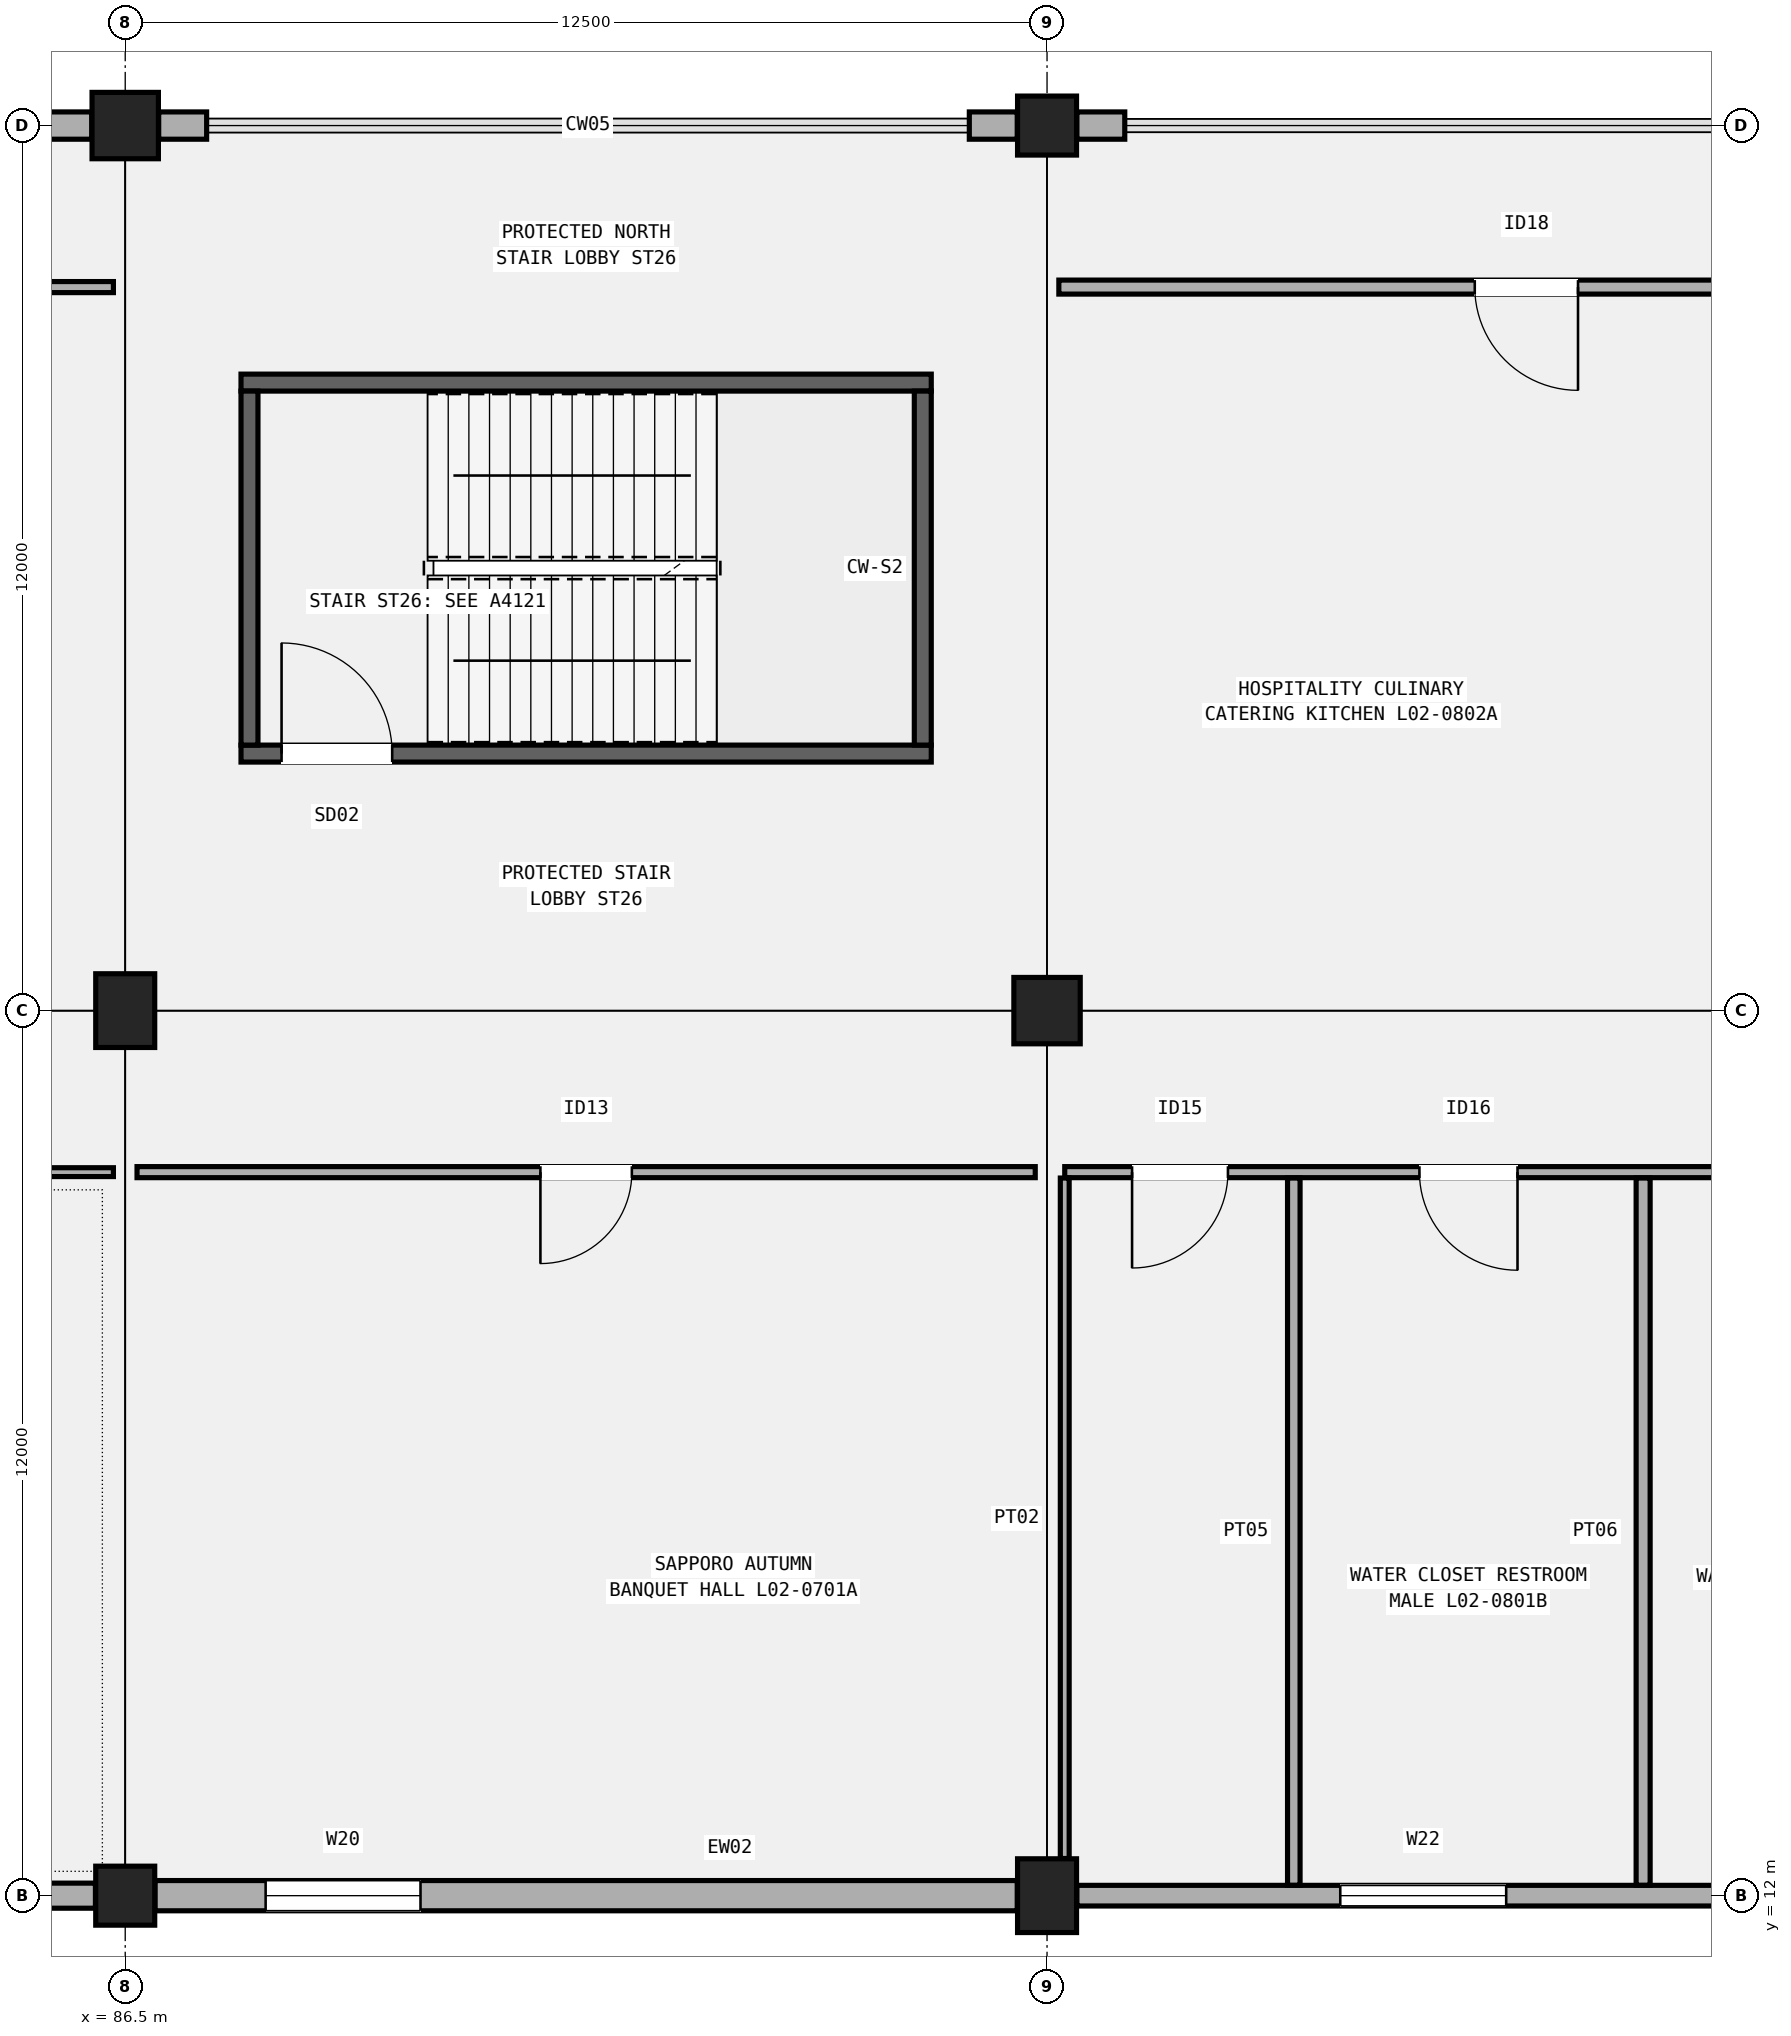
"""IFC4 building model, lengths in metres.
Left out: names, types, materials, properties, quantities, classifications, styles, units other than length and angle.
Written with IfcOpenShell. Run it as: python <this file> out.ifc"""

import sys

from ifc_helpers import new_model, si_unit, direction, frame, frame_2d, origin, origin_2d, place, context, subcontext, project, spatial, rectangle, extrude, element, fill, save


model = new_model("IFC4")
c1 = context("Model", 3, precision=1e-05, world=origin(), true_north=direction((0.0, 1.0)))
c2 = subcontext(c1, "Body", "Model", "MODEL_VIEW")
j1 = project(units=[si_unit("LENGTHUNIT", "METRE"), si_unit("PLANEANGLEUNIT", "RADIAN")], contexts=[c1])
p1 = place(None, origin())
s1 = spatial("IfcSite", under=j1, at=p1, CompositionType="ELEMENT")
p2 = place(p1, origin())
s2 = spatial("IfcBuilding", under=s1, at=p2, CompositionType="ELEMENT")
p3 = place(p2, frame((0.0, 0.0, 10.2)))
s3 = spatial("IfcBuildingStorey", under=s2, at=p3, CompositionType="ELEMENT", Elevation=10.2)
p4 = place(p3, frame((86.5, 12.0, 0.0), z_axis=(0.0, 0.0, 1.0), x_axis=(1.0, 0.0, 0.0)))
e1 = element("IfcColumn", 1, at=p4, inside=s3, PredefinedType="COLUMN", context=c2, shape_type="SweptSolid", body=[
    extrude(rectangle(XDim=0.8, YDim=0.8, at=origin_2d()), origin(), (0.0, 0.0, 1.0), 5.1),
])
p5 = place(p3, frame((86.5, 24.0, 0.0), z_axis=(0.0, 0.0, 1.0), x_axis=(1.0, 0.0, 0.0)))
e2 = element("IfcColumn", 2, at=p5, inside=s3, PredefinedType="COLUMN", context=c2, shape_type="SweptSolid", body=[
    extrude(rectangle(XDim=0.8, YDim=1.0, at=origin_2d()), origin(), (0.0, 0.0, 1.0), 5.1),
])
p6 = place(p3, frame((86.5, 36.0, 0.0), z_axis=(0.0, 0.0, 1.0), x_axis=(1.0, 0.0, 0.0)))
e3 = element("IfcColumn", 3, at=p6, inside=s3, PredefinedType="COLUMN", context=c2, shape_type="SweptSolid", body=[
    extrude(rectangle(XDim=0.9, YDim=0.9, at=origin_2d()), origin(), (0.0, 0.0, 1.0), 5.1),
])
p7 = place(p3, frame((99.0, 12.0, 0.0), z_axis=(0.0, 0.0, 1.0), x_axis=(1.0, 0.0, 0.0)))
e4 = element("IfcColumn", 4, at=p7, inside=s3, PredefinedType="COLUMN", context=c2, shape_type="SweptSolid", body=[
    extrude(rectangle(XDim=0.8, YDim=1.0, at=origin_2d()), origin(), (0.0, 0.0, 1.0), 5.1),
])
p8 = place(p3, frame((99.0, 24.0, 0.0), z_axis=(0.0, 0.0, 1.0), x_axis=(1.0, 0.0, 0.0)))
e5 = element("IfcColumn", 5, at=p8, inside=s3, PredefinedType="COLUMN", context=c2, shape_type="SweptSolid", body=[
    extrude(rectangle(XDim=0.9, YDim=0.9, at=origin_2d()), origin(), (0.0, 0.0, 1.0), 5.1),
])
p9 = place(p3, frame((99.0, 36.0, 0.0), z_axis=(0.0, 0.0, 1.0), x_axis=(1.0, 0.0, 0.0)))
e6 = element("IfcColumn", 6, at=p9, inside=s3, PredefinedType="COLUMN", context=c2, shape_type="SweptSolid", body=[
    extrude(rectangle(XDim=0.8, YDim=0.8, at=origin_2d()), origin(), (0.0, 0.0, 1.0), 5.1),
])
p10 = place(p3, frame((74.454, 12.0, 0.0), z_axis=(0.0, 0.0, 1.0), x_axis=(1.0, 0.0, 0.0)))
e7 = element("IfcWall", 7, at=p10, inside=s3, PredefinedType="SOLIDWALL", context=c2, shape_type="SweptSolid", body=[
    extrude(rectangle(XDim=11.642, YDim=0.34, at=frame_2d((5.821, 0.0))), origin(), (0.0, 0.0, 1.0), 4.12),
])
p11 = place(p10, frame((1.5, 0.0, 0.95)))
e8 = element("IfcOpeningElement", 8, at=p11, cuts=e7, PredefinedType="OPENING", context=c2, shape_type="SweptSolid", body=[
    extrude(rectangle(XDim=2.1, YDim=1.85, at=frame_2d((1.05, 0.925))), frame((0.0, 0.18, 0.0), z_axis=(0.0, -1.0, 0.0), x_axis=(1.0, 0.0, 0.0)), (0.0, 0.0, 1.0), 0.36),
])
p12 = place(p3, frame((85.396, 36.0, 0.0), z_axis=(0.0, 0.0, 1.0), x_axis=(1.0, 0.0, 0.0)))
e9 = element("IfcWall", 9, at=p12, inside=s3, PredefinedType="SOLIDWALL", context=c2, shape_type="SweptSolid", body=[
    extrude(rectangle(XDim=0.65, YDim=0.37, at=frame_2d((0.325, 0.0))), origin(), (0.0, 0.0, 1.0), 4.02),
])
p13 = place(p3, frame((86.904, 12.0, 0.0), z_axis=(0.0, 0.0, 1.0), x_axis=(1.0, 0.0, 0.0)))
e10 = element("IfcWall", 10, at=p13, inside=s3, PredefinedType="SOLIDWALL", context=c2, shape_type="SweptSolid", body=[
    extrude(rectangle(XDim=11.692, YDim=0.41, at=frame_2d((5.846, 0.0))), origin(), (0.0, 0.0, 1.0), 4.22),
])
p14 = place(p13, frame((1.5, 0.0, 0.95)))
e11 = element("IfcOpeningElement", 11, at=p14, cuts=e10, PredefinedType="OPENING", context=c2, shape_type="SweptSolid", body=[
    extrude(rectangle(XDim=2.1, YDim=2.6, at=frame_2d((1.05, 1.3))), frame((0.0, 0.215, 0.0), z_axis=(0.0, -1.0, 0.0), x_axis=(1.0, 0.0, 0.0)), (0.0, 0.0, 1.0), 0.43),
])
for number, where, z_axis, x_axis in (
    (12, (86.954, 36.0, 0.0), (0.0, 0.0, 1.0), (1.0, 0.0, 0.0)),
    (13, (97.946, 36.0, 0.0), (0.0, 0.0, 1.0), (1.0, 0.0, 0.0)),
):
    element("IfcWall", number, at=place(p3, frame(where, z_axis=z_axis, x_axis=x_axis)), inside=s3, PredefinedType="SOLIDWALL", context=c2, shape_type="SweptSolid", body=[
        extrude(rectangle(XDim=0.65, YDim=0.37, at=frame_2d((0.325, 0.0))), origin(), (0.0, 0.0, 1.0), 4.12),
    ])
p15 = place(p3, frame((99.404, 12.0, 0.0), z_axis=(0.0, 0.0, 1.0), x_axis=(1.0, 0.0, 0.0)))
e14 = element("IfcWall", 14, at=p15, inside=s3, PredefinedType="SOLIDWALL", context=c2, shape_type="SweptSolid", body=[
    extrude(rectangle(XDim=12.142, YDim=0.28, at=frame_2d((6.071, 0.0))), origin(), (0.0, 0.0, 1.0), 4.02),
])
p16 = place(p15, frame((3.572, 0.0, 0.95)))
e15 = element("IfcOpeningElement", 15, at=p16, cuts=e14, PredefinedType="OPENING", context=c2, shape_type="SweptSolid", body=[
    extrude(rectangle(XDim=2.25, YDim=2.2, at=frame_2d((1.125, 1.1))), frame((0.0, 0.15, 0.0), z_axis=(0.0, -1.0, 0.0), x_axis=(1.0, 0.0, 0.0)), (0.0, 0.0, 1.0), 0.3),
])
p17 = place(p3, frame((99.404, 36.0, 0.0), z_axis=(0.0, 0.0, 1.0), x_axis=(1.0, 0.0, 0.0)))
e16 = element("IfcWall", 16, at=p17, inside=s3, PredefinedType="SOLIDWALL", context=c2, shape_type="SweptSolid", body=[
    extrude(rectangle(XDim=0.65, YDim=0.37, at=frame_2d((0.325, 0.0))), origin(), (0.0, 0.0, 1.0), 4.22),
])
p18 = place(p3, frame((88.07, 27.485, 0.0), z_axis=(0.0, 0.0, 1.0), x_axis=(1.0, 0.0, 0.0)))
e17 = element("IfcWall", 17, at=p18, inside=s3, PredefinedType="SHEAR", context=c2, shape_type="SweptSolid", body=[
    extrude(rectangle(XDim=9.36, YDim=0.23, at=frame_2d((4.68, 0.0))), origin(), (0.0, 0.0, 1.0), 4.82),
])
p19 = place(p18, frame((0.55, 0.0, 0.0)))
e18 = element("IfcOpeningElement", 18, at=p19, cuts=e17, PredefinedType="OPENING", context=c2, shape_type="SweptSolid", body=[
    extrude(rectangle(XDim=1.5, YDim=2.2, at=frame_2d((0.75, 1.1))), frame((0.0, 0.125, 0.0), z_axis=(0.0, -1.0, 0.0), x_axis=(1.0, 0.0, 0.0)), (0.0, 0.0, 1.0), 0.25),
])
p20 = place(p3, frame((88.07, 32.515, 0.0), z_axis=(0.0, 0.0, 1.0), x_axis=(1.0, 0.0, 0.0)))
e19 = element("IfcWall", 19, at=p20, inside=s3, PredefinedType="SHEAR", context=c2, shape_type="SweptSolid", body=[
    extrude(rectangle(XDim=9.36, YDim=0.23, at=frame_2d((4.68, 0.0))), origin(), (0.0, 0.0, 1.0), 4.82),
])
for number, where, z_axis, x_axis in (
    (20, (88.185, 27.6, 0.0), (0.0, 0.0, 1.0), (0.0, 1.0, 0.0)),
    (21, (97.315, 27.6, 0.0), (0.0, 0.0, 1.0), (0.0, 1.0, 0.0)),
):
    element("IfcWall", number, at=place(p3, frame(where, z_axis=z_axis, x_axis=x_axis)), inside=s3, PredefinedType="SHEAR", context=c2, shape_type="SweptSolid", body=[
        extrude(rectangle(XDim=4.8, YDim=0.23, at=frame_2d((2.4, 0.0))), origin(), (0.0, 0.0, 1.0), 4.82),
    ])
p21 = place(p3, frame((74.16, 21.81, 0.0), z_axis=(0.0, 0.0, 1.0), x_axis=(1.0, 0.0, 0.0)))
e22 = element("IfcWall", 22, at=p21, inside=s3, PredefinedType="PARTITIONING", context=c2, shape_type="SweptSolid", body=[
    extrude(rectangle(XDim=12.18, YDim=0.12, at=frame_2d((6.09, 0.0))), origin(), (0.0, 0.0, 1.0), 4.22),
])
p22 = place(p21, frame((6.65, 0.0, 0.0), z_axis=(0.0, 0.0, 1.0), x_axis=(-1.0, 0.0, 0.0)))
e23 = element("IfcOpeningElement", 23, at=p22, cuts=e22, PredefinedType="OPENING", context=c2, shape_type="SweptSolid", body=[
    extrude(rectangle(XDim=1.12, YDim=2.18, at=frame_2d((0.56, 1.09))), frame((0.0, 0.07, 0.0), z_axis=(0.0, -1.0, 0.0), x_axis=(1.0, 0.0, 0.0)), (0.0, 0.0, 1.0), 0.14),
])
p23 = place(p3, frame((74.16, 33.81, 0.0), z_axis=(0.0, 0.0, 1.0), x_axis=(1.0, 0.0, 0.0)))
e24 = element("IfcWall", 24, at=p23, inside=s3, PredefinedType="PARTITIONING", context=c2, shape_type="SweptSolid", body=[
    extrude(rectangle(XDim=12.18, YDim=0.15, at=frame_2d((6.09, 0.0))), origin(), (0.0, 0.0, 1.0), 4.22),
])
p24 = place(p23, frame((6.665, 0.0, 0.0), z_axis=(0.0, 0.0, 1.0), x_axis=(-1.0, 0.0, 0.0)))
e25 = element("IfcOpeningElement", 25, at=p24, cuts=e24, PredefinedType="OPENING", context=c2, shape_type="SweptSolid", body=[
    extrude(rectangle(XDim=1.15, YDim=2.15, at=frame_2d((0.575, 1.075))), frame((0.0, 0.085, 0.0), z_axis=(0.0, -1.0, 0.0), x_axis=(1.0, 0.0, 0.0)), (0.0, 0.0, 1.0), 0.17),
])
p25 = place(p3, frame((86.66, 21.81, 0.0), z_axis=(0.0, 0.0, 1.0), x_axis=(1.0, 0.0, 0.0)))
e26 = element("IfcWall", 26, at=p25, inside=s3, PredefinedType="PARTITIONING", context=c2, shape_type="SweptSolid", body=[
    extrude(rectangle(XDim=12.18, YDim=0.15, at=frame_2d((6.09, 0.0))), origin(), (0.0, 0.0, 1.0), 4.22),
])
p26 = place(p25, frame((6.71, 0.0, 0.0), z_axis=(0.0, 0.0, 1.0), x_axis=(-1.0, 0.0, 0.0)))
e27 = element("IfcOpeningElement", 27, at=p26, cuts=e26, PredefinedType="OPENING", context=c2, shape_type="SweptSolid", body=[
    extrude(rectangle(XDim=1.24, YDim=2.22, at=frame_2d((0.62, 1.11))), frame((0.0, 0.085, 0.0), z_axis=(0.0, -1.0, 0.0), x_axis=(1.0, 0.0, 0.0)), (0.0, 0.0, 1.0), 0.17),
])
p27 = place(p3, frame((99.24, 21.81, 0.0), z_axis=(0.0, 0.0, 1.0), x_axis=(1.0, 0.0, 0.0)))
e28 = element("IfcWall", 28, at=p27, inside=s3, PredefinedType="PARTITIONING", context=c2, shape_type="SweptSolid", body=[
    extrude(rectangle(XDim=12.52, YDim=0.15, at=frame_2d((6.26, 0.0))), origin(), (0.0, 0.0, 1.0), 4.22),
])
p28 = place(p27, frame((2.213, 0.0, 0.0), z_axis=(0.0, 0.0, 1.0), x_axis=(-1.0, 0.0, 0.0)))
e29 = element("IfcOpeningElement", 29, at=p28, cuts=e28, PredefinedType="OPENING", context=c2, shape_type="SweptSolid", body=[
    extrude(rectangle(XDim=1.3, YDim=2.24, at=frame_2d((0.65, 1.12))), frame((0.0, 0.085, 0.0), z_axis=(0.0, -1.0, 0.0), x_axis=(1.0, 0.0, 0.0)), (0.0, 0.0, 1.0), 0.17),
])
p29 = place(p27, frame((6.14, 0.0, 0.0), z_axis=(0.0, 0.0, 1.0), x_axis=(-1.0, 0.0, 0.0)))
e30 = element("IfcOpeningElement", 30, at=p29, cuts=e28, PredefinedType="OPENING", context=c2, shape_type="SweptSolid", body=[
    extrude(rectangle(XDim=1.33, YDim=2.22, at=frame_2d((0.665, 1.11))), frame((0.0, 0.085, 0.0), z_axis=(0.0, -1.0, 0.0), x_axis=(1.0, 0.0, 0.0)), (0.0, 0.0, 1.0), 0.17),
])
p30 = place(p27, frame((10.852, 0.0, 0.0), z_axis=(0.0, 0.0, 1.0), x_axis=(-1.0, 0.0, 0.0)))
e31 = element("IfcOpeningElement", 31, at=p30, cuts=e28, PredefinedType="OPENING", context=c2, shape_type="SweptSolid", body=[
    extrude(rectangle(XDim=1.36, YDim=2.25, at=frame_2d((0.68, 1.125))), frame((0.0, 0.085, 0.0), z_axis=(0.0, -1.0, 0.0), x_axis=(1.0, 0.0, 0.0)), (0.0, 0.0, 1.0), 0.17),
])
p31 = place(p3, frame((99.24, 12.504, 0.0), z_axis=(0.0, 0.0, 1.0), x_axis=(0.0, 1.0, 0.0)))
e32 = element("IfcWall", 32, at=p31, inside=s3, PredefinedType="PARTITIONING", context=c2, shape_type="SweptSolid", body=[
    extrude(rectangle(XDim=9.226, YDim=0.12, at=frame_2d((4.613, 0.0))), origin(), (0.0, 0.0, 1.0), 3.98),
])
p32 = place(p3, frame((102.346, 12.142, 0.0), z_axis=(0.0, 0.0, 1.0), x_axis=(0.0, 1.0, 0.0)))
e33 = element("IfcWall", 33, at=p32, inside=s3, PredefinedType="PARTITIONING", context=c2, shape_type="SweptSolid", body=[
    extrude(rectangle(XDim=9.588, YDim=0.17, at=frame_2d((4.794, 0.0))), origin(), (0.0, 0.0, 1.0), 4.22),
])
p33 = place(p3, frame((107.083, 12.142, 0.0), z_axis=(0.0, 0.0, 1.0), x_axis=(0.0, 1.0, 0.0)))
e34 = element("IfcWall", 34, at=p33, inside=s3, PredefinedType="PARTITIONING", context=c2, shape_type="SweptSolid", body=[
    extrude(rectangle(XDim=9.588, YDim=0.19, at=frame_2d((4.794, 0.0))), origin(), (0.0, 0.0, 1.0), 4.22),
])
p34 = place(p3, frame((99.16, 33.81, 0.0), z_axis=(0.0, 0.0, 1.0), x_axis=(1.0, 0.0, 0.0)))
e35 = element("IfcWall", 35, at=p34, inside=s3, PredefinedType="PARTITIONING", context=c2, shape_type="SweptSolid", body=[
    extrude(rectangle(XDim=12.68, YDim=0.19, at=frame_2d((6.34, 0.0))), origin(), (0.0, 0.0, 1.0), 4.22),
])
p35 = place(p34, frame((7.04, 0.0, 0.0), z_axis=(0.0, 0.0, 1.0), x_axis=(-1.0, 0.0, 0.0)))
e36 = element("IfcOpeningElement", 36, at=p35, cuts=e35, PredefinedType="OPENING", context=c2, shape_type="SweptSolid", body=[
    extrude(rectangle(XDim=1.4, YDim=2.24, at=frame_2d((0.7, 1.12))), frame((0.0, 0.105, 0.0), z_axis=(0.0, -1.0, 0.0), x_axis=(1.0, 0.0, 0.0)), (0.0, 0.0, 1.0), 0.21),
])
p36 = place(p14, origin())
e37 = element("IfcWindow", 37, at=p36, inside=s3, PartitioningType="SINGLE_PANEL", PredefinedType="WINDOW", context=c2, shape_type="SweptSolid", body=[
    extrude(rectangle(XDim=2.1, YDim=2.6, at=frame_2d((1.05, 1.3))), frame((0.0, 0.03, 0.0), z_axis=(0.0, -1.0, 0.0), x_axis=(1.0, 0.0, 0.0)), (0.0, 0.0, 1.0), 0.06),
])
fill(e11, e37)
p37 = place(p16, origin())
e38 = element("IfcWindow", 38, at=p37, inside=s3, PartitioningType="SINGLE_PANEL", PredefinedType="WINDOW", context=c2, shape_type="SweptSolid", body=[
    extrude(rectangle(XDim=2.25, YDim=2.2, at=frame_2d((1.125, 1.1))), frame((0.0, 0.03, 0.0), z_axis=(0.0, -1.0, 0.0), x_axis=(1.0, 0.0, 0.0)), (0.0, 0.0, 1.0), 0.06),
])
fill(e15, e38)
p38 = place(p19, origin())
e39 = element("IfcDoor", 39, at=p38, inside=s3, OperationType="SINGLE_SWING_LEFT", PredefinedType="DOOR", context=c2, shape_type="SweptSolid", body=[
    extrude(rectangle(XDim=1.5, YDim=2.2, at=frame_2d((0.75, 1.1))), frame((0.0, 0.025, 0.0), z_axis=(0.0, -1.0, 0.0), x_axis=(1.0, 0.0, 0.0)), (0.0, 0.0, 1.0), 0.05),
])
fill(e18, e39)
p39 = place(p26, origin())
e40 = element("IfcDoor", 40, at=p39, inside=s3, OperationType="SINGLE_SWING_RIGHT", PredefinedType="DOOR", context=c2, shape_type="SweptSolid", body=[
    extrude(rectangle(XDim=1.24, YDim=2.22, at=frame_2d((0.62, 1.11))), frame((0.0, 0.025, 0.0), z_axis=(0.0, -1.0, 0.0), x_axis=(1.0, 0.0, 0.0)), (0.0, 0.0, 1.0), 0.05),
])
fill(e27, e40)
p40 = place(p28, origin())
e41 = element("IfcDoor", 41, at=p40, inside=s3, OperationType="SINGLE_SWING_RIGHT", PredefinedType="DOOR", context=c2, shape_type="SweptSolid", body=[
    extrude(rectangle(XDim=1.3, YDim=2.24, at=frame_2d((0.65, 1.12))), frame((0.0, 0.025, 0.0), z_axis=(0.0, -1.0, 0.0), x_axis=(1.0, 0.0, 0.0)), (0.0, 0.0, 1.0), 0.05),
])
fill(e29, e41)
p41 = place(p29, origin())
e42 = element("IfcDoor", 42, at=p41, inside=s3, OperationType="SINGLE_SWING_LEFT", PredefinedType="DOOR", context=c2, shape_type="SweptSolid", body=[
    extrude(rectangle(XDim=1.33, YDim=2.22, at=frame_2d((0.665, 1.11))), frame((0.0, 0.025, 0.0), z_axis=(0.0, -1.0, 0.0), x_axis=(1.0, 0.0, 0.0)), (0.0, 0.0, 1.0), 0.05),
])
fill(e30, e42)
p42 = place(p35, origin())
e43 = element("IfcDoor", 43, at=p42, inside=s3, OperationType="SINGLE_SWING_LEFT", PredefinedType="DOOR", context=c2, shape_type="SweptSolid", body=[
    extrude(rectangle(XDim=1.4, YDim=2.24, at=frame_2d((0.7, 1.12))), frame((0.0, 0.025, 0.0), z_axis=(0.0, -1.0, 0.0), x_axis=(1.0, 0.0, 0.0)), (0.0, 0.0, 1.0), 0.05),
])
fill(e36, e43)
save(model, sys.argv[1])
